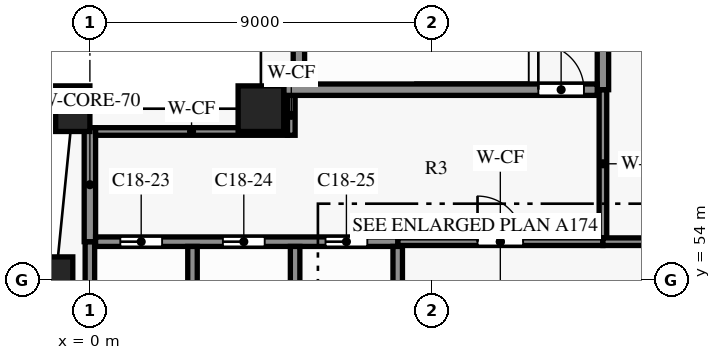
"""IFC4 building model, lengths in metres.
Left out: names, types, materials, properties, quantities, classifications, styles, units other than length and angle.
Written with IfcOpenShell. Run it as: python <this file> out.ifc"""

import sys

from ifc_helpers import new_model, si_unit, direction, frame, frame_2d, origin, origin_2d, place, context, subcontext, project, spatial, rectangle, extrude, element, fill, save


model = new_model("IFC4")
c1 = context("Model", 3, precision=1e-05, world=origin(), true_north=direction((0.0, 1.0)))
c2 = subcontext(c1, "Body", "Model", "MODEL_VIEW")
j1 = project(units=[si_unit("LENGTHUNIT", "METRE"), si_unit("PLANEANGLEUNIT", "RADIAN")], contexts=[c1])
p1 = place(None, origin())
s1 = spatial("IfcSite", under=j1, at=p1, CompositionType="ELEMENT")
p2 = place(p1, origin())
s2 = spatial("IfcBuilding", under=s1, at=p2, CompositionType="ELEMENT")
p3 = place(p2, frame((0.0, 0.0, 130.3)))
s3 = spatial("IfcBuildingStorey", under=s2, at=p3, CompositionType="ELEMENT", Elevation=130.3)
for number, where, z_axis, x_axis in (
    (1, (-0.45, 58.5, 0.0), (0.0, 0.0, 1.0), (-0.1, -0.995, 0.0)),
    (2, (-0.9, 54.0, 0.0), (0.0, 0.0, 1.0), (0.0, -1.0, 0.0)),
):
    element("IfcColumn", number, at=place(p3, frame(where, z_axis=z_axis, x_axis=x_axis)), inside=s3, PredefinedType="COLUMN", context=c2, shape_type="SweptSolid", body=[
        extrude(rectangle(XDim=0.9, YDim=1.2, at=origin_2d()), origin(), (0.0, 0.0, 1.0), 3.8),
    ])
p4 = place(p3, frame((4.5, 58.5, 0.0), z_axis=(0.0, 0.0, 1.0), x_axis=(1.0, 0.0, 0.0)))
e3 = element("IfcColumn", 3, at=p4, inside=s3, PredefinedType="COLUMN", context=c2, shape_type="SweptSolid", body=[
    extrude(rectangle(XDim=1.2, YDim=1.2, at=origin_2d()), origin(), (0.0, 0.0, 1.0), 3.8),
])
p5 = place(p3, frame((8.1, 55.0, 0.0), z_axis=(0.0, 0.0, 1.0), x_axis=(1.0, 0.0, 0.0)))
e4 = element("IfcWall", 4, at=p5, inside=s3, PredefinedType="PARTITIONING", context=c2, shape_type="SweptSolid", body=[
    extrude(rectangle(XDim=5.4, YDim=0.2, at=frame_2d((2.7, 0.0))), origin(), (0.0, 0.0, 1.0), 3.5),
])
p6 = place(p5, frame((2.1, 0.0, 0.0)))
e5 = element("IfcOpeningElement", 5, at=p6, cuts=e4, PredefinedType="OPENING", context=c2, shape_type="SweptSolid", body=[
    extrude(rectangle(XDim=1.2, YDim=2.2, at=frame_2d((0.6, 1.1))), frame((0.0, 0.11, 0.0), z_axis=(0.0, -1.0, 0.0), x_axis=(1.0, 0.0, 0.0)), (0.0, 0.0, 1.0), 0.22),
])
p7 = place(p3, frame((13.5, 55.0, 0.0), z_axis=(0.0, 0.0, 1.0), x_axis=(1.0, 0.0, 0.0)))
e6 = element("IfcWall", 6, at=p7, inside=s3, PredefinedType="PARTITIONING", context=c2, shape_type="SweptSolid", body=[
    extrude(rectangle(XDim=4.0, YDim=0.2, at=frame_2d((2.0, 0.0))), origin(), (0.0, 0.0, 1.0), 3.5),
])
p8 = place(p7, frame((1.5, 0.0, 0.0)))
e7 = element("IfcOpeningElement", 7, at=p8, cuts=e6, PredefinedType="OPENING", context=c2, shape_type="SweptSolid", body=[
    extrude(rectangle(XDim=1.0, YDim=2.1, at=frame_2d((0.5, 1.05))), frame((0.0, 0.11, 0.0), z_axis=(0.0, -1.0, 0.0), x_axis=(1.0, 0.0, 0.0)), (0.0, 0.0, 1.0), 0.22),
])
p9 = place(p3, frame((0.15, 55.0, 0.0), z_axis=(0.0, 0.0, 1.0), x_axis=(1.0, 0.0, 0.0)))
e8 = element("IfcWall", 8, at=p9, inside=s3, PredefinedType="SHEAR", context=c2, shape_type="SweptSolid", body=[
    extrude(rectangle(XDim=7.95, YDim=0.25, at=frame_2d((3.975, 0.0))), origin(), (0.0, 0.0, 1.0), 3.5),
])
p10 = place(p9, frame((0.65, 0.0, 0.0)))
e9 = element("IfcOpeningElement", 9, at=p10, cuts=e8, PredefinedType="OPENING", context=c2, shape_type="SweptSolid", body=[
    extrude(rectangle(XDim=1.1, YDim=2.1, at=frame_2d((0.55, 1.05))), frame((0.0, 0.135, 0.0), z_axis=(0.0, -1.0, 0.0), x_axis=(1.0, 0.0, 0.0)), (0.0, 0.0, 1.0), 0.27),
])
p11 = place(p9, frame((3.35, 0.0, 0.0)))
e10 = element("IfcOpeningElement", 10, at=p11, cuts=e8, PredefinedType="OPENING", context=c2, shape_type="SweptSolid", body=[
    extrude(rectangle(XDim=1.1, YDim=2.1, at=frame_2d((0.55, 1.05))), frame((0.0, 0.135, 0.0), z_axis=(0.0, -1.0, 0.0), x_axis=(1.0, 0.0, 0.0)), (0.0, 0.0, 1.0), 0.27),
])
p12 = place(p9, frame((6.05, 0.0, 0.0)))
e11 = element("IfcOpeningElement", 11, at=p12, cuts=e8, PredefinedType="OPENING", context=c2, shape_type="SweptSolid", body=[
    extrude(rectangle(XDim=1.1, YDim=2.1, at=frame_2d((0.55, 1.05))), frame((0.0, 0.135, 0.0), z_axis=(0.0, -1.0, 0.0), x_axis=(1.0, 0.0, 0.0)), (0.0, 0.0, 1.0), 0.27),
])
p13 = place(p3, frame((0.15, 57.9, 0.0), z_axis=(0.0, 0.0, 1.0), x_axis=(1.0, 0.0, 0.0)))
e12 = element("IfcWall", 12, at=p13, inside=s3, PredefinedType="PARTITIONING", context=c2, shape_type="SweptSolid", body=[
    extrude(rectangle(XDim=5.05, YDim=0.2, at=frame_2d((2.525, 0.0))), origin(), (0.0, 0.0, 1.0), 3.5),
])
p14 = place(p3, frame((5.1, 59.0, 0.0), z_axis=(0.0, 0.0, 1.0), x_axis=(1.0, 0.0, 0.0)))
e13 = element("IfcWall", 13, at=p14, inside=s3, PredefinedType="SHEAR", context=c2, shape_type="SweptSolid", body=[
    extrude(rectangle(XDim=8.25, YDim=0.3, at=frame_2d((4.125, 0.0))), origin(), (0.0, 0.0, 1.0), 3.5),
])
p15 = place(p14, frame((6.7, 0.0, 0.0)))
e14 = element("IfcOpeningElement", 14, at=p15, cuts=e13, PredefinedType="OPENING", context=c2, shape_type="SweptSolid", body=[
    extrude(rectangle(XDim=1.2, YDim=2.2, at=frame_2d((0.6, 1.1))), frame((0.0, 0.16, 0.0), z_axis=(0.0, -1.0, 0.0), x_axis=(1.0, 0.0, 0.0)), (0.0, 0.0, 1.0), 0.32),
])
p16 = place(p3, frame((0.0, 55.0, 0.0), z_axis=(0.0, 0.0, 1.0), x_axis=(0.0, 1.0, 0.0)))
e15 = element("IfcWall", 15, at=p16, inside=s3, PredefinedType="SHEAR", context=c2, shape_type="SweptSolid", body=[
    extrude(rectangle(XDim=3.0, YDim=0.3, at=frame_2d((1.5, 0.0))), origin(), (0.0, 0.0, 1.0), 3.5),
])
p17 = place(p3, frame((0.0, 51.65, 0.0), z_axis=(0.0, 0.0, 1.0), x_axis=(0.0, 1.0, 0.0)))
e16 = element("IfcWall", 16, at=p17, inside=s3, PredefinedType="SHEAR", context=c2, shape_type="SweptSolid", body=[
    extrude(rectangle(XDim=3.35, YDim=0.25, at=frame_2d((1.675, 0.0))), origin(), (0.0, 0.0, 1.0), 3.5),
])
p18 = place(p3, frame((2.7, 51.925, 0.0), z_axis=(0.0, 0.0, 1.0), x_axis=(0.0, 1.0, 0.0)))
e17 = element("IfcWall", 17, at=p18, inside=s3, PredefinedType="SHEAR", context=c2, shape_type="SweptSolid", body=[
    extrude(rectangle(XDim=2.95, YDim=0.25, at=frame_2d((1.475, 0.0))), origin(), (0.0, 0.0, 1.0), 3.5),
])
p19 = place(p3, frame((5.3, 57.8, 0.0), z_axis=(0.0, 0.0, 1.0), x_axis=(0.0, 1.0, 0.0)))
e18 = element("IfcWall", 18, at=p19, inside=s3, PredefinedType="PARTITIONING", context=c2, shape_type="SweptSolid", body=[
    extrude(rectangle(XDim=1.05, YDim=0.2, at=frame_2d((0.525, 0.0))), origin(), (0.0, 0.0, 1.0), 3.5),
])
p20 = place(p3, frame((5.4, 51.925, 0.0), z_axis=(0.0, 0.0, 1.0), x_axis=(0.0, 1.0, 0.0)))
e19 = element("IfcWall", 19, at=p20, inside=s3, PredefinedType="SHEAR", context=c2, shape_type="SweptSolid", body=[
    extrude(rectangle(XDim=2.95, YDim=0.25, at=frame_2d((1.475, 0.0))), origin(), (0.0, 0.0, 1.0), 3.5),
])
p21 = place(p3, frame((5.5, 59.15, 0.0), z_axis=(0.0, 0.0, 1.0), x_axis=(0.0, 1.0, 0.0)))
e20 = element("IfcWall", 20, at=p21, inside=s3, PredefinedType="SHEAR", context=c2, shape_type="SweptSolid", body=[
    extrude(rectangle(XDim=3.6, YDim=0.3, at=frame_2d((1.8, 0.0))), origin(), (0.0, 0.0, 1.0), 3.5),
])
p22 = place(p3, frame((8.1, 51.925, 0.0), z_axis=(0.0, 0.0, 1.0), x_axis=(0.0, 1.0, 0.0)))
e21 = element("IfcWall", 21, at=p22, inside=s3, PredefinedType="SHEAR", context=c2, shape_type="SweptSolid", body=[
    extrude(rectangle(XDim=2.95, YDim=0.25, at=frame_2d((1.475, 0.0))), origin(), (0.0, 0.0, 1.0), 3.5),
])
p23 = place(p3, frame((13.5, 55.1, 0.0), z_axis=(0.0, 0.0, 1.0), x_axis=(0.0, 1.0, 0.0)))
e22 = element("IfcWall", 22, at=p23, inside=s3, PredefinedType="PARTITIONING", context=c2, shape_type="SweptSolid", body=[
    extrude(rectangle(XDim=3.9, YDim=0.2, at=frame_2d((1.95, 0.0))), origin(), (0.0, 0.0, 1.0), 3.5),
])
p24 = place(p3, frame((13.5, 59.0, 0.0), z_axis=(0.0, 0.0, 1.0), x_axis=(0.0, 1.0, 0.0)))
e23 = element("IfcWall", 23, at=p24, inside=s3, PredefinedType="SHEAR", context=c2, shape_type="SweptSolid", body=[
    extrude(rectangle(XDim=3.847, YDim=0.3, at=frame_2d((1.923, 0.0))), origin(), (0.0, 0.0, 1.0), 3.5),
])
p25 = place(p6, origin())
e24 = element("IfcDoor", 24, at=p25, inside=s3, OperationType="SINGLE_SWING_RIGHT", PredefinedType="DOOR", context=c2, shape_type="SweptSolid", body=[
    extrude(rectangle(XDim=1.2, YDim=2.2, at=frame_2d((0.6, 1.1))), frame((0.0, 0.025, 0.0), z_axis=(0.0, -1.0, 0.0), x_axis=(1.0, 0.0, 0.0)), (0.0, 0.0, 1.0), 0.05),
])
fill(e5, e24)
p26 = place(p15, origin())
e25 = element("IfcDoor", 25, at=p26, inside=s3, OperationType="SINGLE_SWING_RIGHT", PredefinedType="DOOR", context=c2, shape_type="SweptSolid", body=[
    extrude(rectangle(XDim=1.2, YDim=2.2, at=frame_2d((0.6, 1.1))), frame((0.0, 0.025, 0.0), z_axis=(0.0, -1.0, 0.0), x_axis=(1.0, 0.0, 0.0)), (0.0, 0.0, 1.0), 0.05),
])
fill(e14, e25)
p27 = place(p10, origin())
e26 = element("IfcDoor", 26, at=p27, inside=s3, OperationType="DOUBLE_DOOR_SLIDING", PredefinedType="DOOR", context=c2, shape_type="SweptSolid", body=[
    extrude(rectangle(XDim=1.1, YDim=2.1, at=frame_2d((0.55, 1.05))), frame((0.0, 0.025, 0.0), z_axis=(0.0, -1.0, 0.0), x_axis=(1.0, 0.0, 0.0)), (0.0, 0.0, 1.0), 0.05),
])
fill(e9, e26)
p28 = place(p11, origin())
e27 = element("IfcDoor", 27, at=p28, inside=s3, OperationType="DOUBLE_DOOR_SLIDING", PredefinedType="DOOR", context=c2, shape_type="SweptSolid", body=[
    extrude(rectangle(XDim=1.1, YDim=2.1, at=frame_2d((0.55, 1.05))), frame((0.0, 0.025, 0.0), z_axis=(0.0, -1.0, 0.0), x_axis=(1.0, 0.0, 0.0)), (0.0, 0.0, 1.0), 0.05),
])
fill(e10, e27)
p29 = place(p12, origin())
e28 = element("IfcDoor", 28, at=p29, inside=s3, OperationType="DOUBLE_DOOR_SLIDING", PredefinedType="DOOR", context=c2, shape_type="SweptSolid", body=[
    extrude(rectangle(XDim=1.1, YDim=2.1, at=frame_2d((0.55, 1.05))), frame((0.0, 0.025, 0.0), z_axis=(0.0, -1.0, 0.0), x_axis=(1.0, 0.0, 0.0)), (0.0, 0.0, 1.0), 0.05),
])
fill(e11, e28)
save(model, sys.argv[1])
